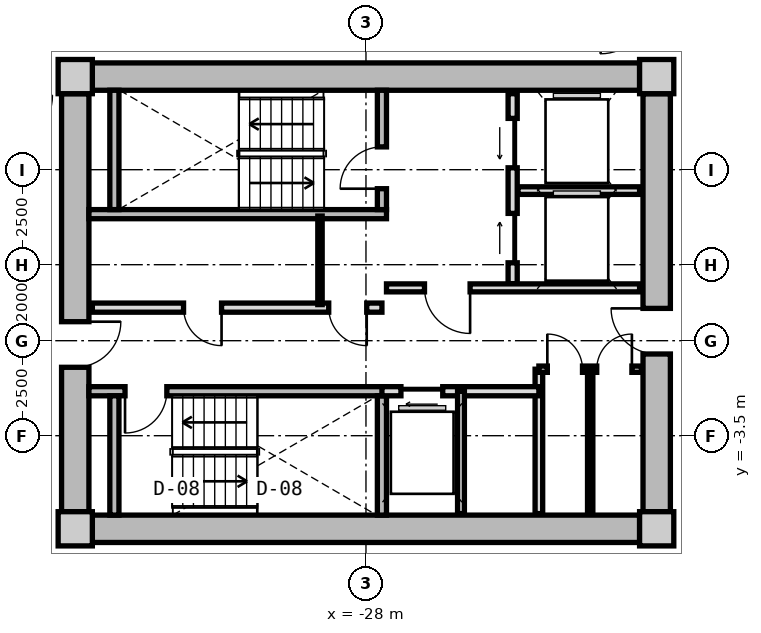
"""IFC4 building model, lengths in metres.
Left out: names, types, materials, properties, quantities, classifications, styles, units other than length and angle.
Written with IfcOpenShell. Run it as: python <this file> out.ifc"""

import sys

from ifc_helpers import new_model, si_unit, direction, frame, frame_2d, origin, origin_2d, place, context, subcontext, project, spatial, rectangle, extrude, source, transform, mapped, element, fill, save


model = new_model("IFC4")
c1 = context("Model", 3, precision=1e-05, world=origin(), true_north=direction((0.0, 1.0)))
c2 = subcontext(c1, "Body", "Model", "MODEL_VIEW")
j1 = project(units=[si_unit("LENGTHUNIT", "METRE"), si_unit("PLANEANGLEUNIT", "RADIAN")], contexts=[c1])
p1 = place(None, origin())
s1 = spatial("IfcSite", under=j1, at=p1, CompositionType="ELEMENT")
p2 = place(p1, origin())
s2 = spatial("IfcBuilding", under=s1, at=p2, CompositionType="ELEMENT")
p3 = place(p2, frame((0.0, 0.0, 123.7)))
s3 = spatial("IfcBuildingStorey", under=s2, at=p3, CompositionType="ELEMENT", Elevation=123.7)
m1 = source(origin(), c2, "Body", "SweptSolid", [
    extrude(rectangle(XDim=0.9, YDim=0.9, at=origin_2d()), origin(), (0.0, 0.0, 1.0), 3.05),
])
for number, where, z_axis, x_axis in (
    (1, (-35.65, -5.95, 0.0), (0.0, 0.0, 1.0), (1.0, 0.0, 0.0)),
    (2, (-20.35, -5.95, 0.0), (0.0, 0.0, 1.0), (1.0, 0.0, 0.0)),
    (3, (-20.35, 5.95, 0.0), (0.0, 0.0, 1.0), (1.0, 0.0, 0.0)),
    (4, (-35.65, 5.95, 0.0), (0.0, 0.0, 1.0), (1.0, 0.0, 0.0)),
):
    element("IfcColumn", number, at=place(p3, frame(where, z_axis=z_axis, x_axis=x_axis)), inside=s3, PredefinedType="COLUMN", context=c2, shape_type="MappedRepresentation", body=[
        mapped(m1, transform((0.0, 0.0, 0.0), x_axis=(1.0, 0.0, 0.0), y_axis=(0.0, 1.0, 0.0), z_axis=(0.0, 0.0, 1.0), scale=1.0)),
    ])
m2 = source(origin(), c2, "Body", "SweptSolid", [
    extrude(rectangle(XDim=14.4, YDim=0.72, at=frame_2d((7.2, 0.0))), origin(), (0.0, 0.0, 1.0), 2.79),
])
for number, where, z_axis, x_axis in (
    (5, (-35.2, 5.95, 0.0), (0.0, 0.0, 1.0), (1.0, 0.0, 0.0)),
    (6, (-20.8, -5.95, 0.0), (0.0, 0.0, 1.0), (-1.0, 0.0, 0.0)),
):
    element("IfcWall", number, at=place(p3, frame(where, z_axis=z_axis, x_axis=x_axis)), inside=s3, PredefinedType="SHEAR", context=c2, shape_type="MappedRepresentation", body=[
        mapped(m2, transform((0.0, 0.0, 0.0), x_axis=(1.0, 0.0, 0.0), y_axis=(0.0, 1.0, 0.0), z_axis=(0.0, 0.0, 1.0), scale=1.0)),
    ])
m3 = source(origin(), c2, "Body", "SweptSolid", [
    extrude(rectangle(XDim=11.0, YDim=0.72, at=frame_2d((5.5, 0.0))), origin(), (0.0, 0.0, 1.0), 2.79),
])
p4 = place(p3, frame((-35.65, -5.5, 0.0), z_axis=(0.0, 0.0, 1.0), x_axis=(0.0, 1.0, 0.0)))
e7 = element("IfcWall", 7, at=p4, inside=s3, PredefinedType="SHEAR", context=c2, shape_type="MappedRepresentation", body=[
    mapped(m3, transform((0.0, 0.0, 0.0), x_axis=(1.0, 0.0, 0.0), y_axis=(0.0, 1.0, 0.0), z_axis=(0.0, 0.0, 1.0), scale=1.0)),
])
p5 = place(p4, frame((3.8, 0.0, 0.0)))
e8 = element("IfcOpeningElement", 8, at=p5, cuts=e7, PredefinedType="OPENING", context=c2, shape_type="SweptSolid", body=[
    extrude(rectangle(XDim=1.2, YDim=2.15, at=frame_2d((0.6, 1.075))), frame((0.0, 0.37, 0.0), z_axis=(0.0, -1.0, 0.0), x_axis=(1.0, 0.0, 0.0)), (0.0, 0.0, 1.0), 0.74),
])
p6 = place(p3, frame((-20.35, 5.5, 0.0), z_axis=(0.0, 0.0, 1.0), x_axis=(0.0, -1.0, 0.0)))
e9 = element("IfcWall", 9, at=p6, inside=s3, PredefinedType="SHEAR", context=c2, shape_type="MappedRepresentation", body=[
    mapped(m3, transform((0.0, 0.0, 0.0), x_axis=(1.0, 0.0, 0.0), y_axis=(0.0, 1.0, 0.0), z_axis=(0.0, 0.0, 1.0), scale=1.0)),
])
p7 = place(p6, frame((5.65, 0.0, 0.0)))
e10 = element("IfcOpeningElement", 10, at=p7, cuts=e9, PredefinedType="OPENING", context=c2, shape_type="SweptSolid", body=[
    extrude(rectangle(XDim=1.2, YDim=2.15, at=frame_2d((0.6, 1.075))), frame((0.0, 0.37, 0.0), z_axis=(0.0, -1.0, 0.0), x_axis=(1.0, 0.0, 0.0)), (0.0, 0.0, 1.0), 0.74),
])
m4 = source(origin(), c2, "Body", "SweptSolid", [
    extrude(rectangle(XDim=7.83, YDim=0.24, at=frame_2d((3.915, 0.0))), origin(), (0.0, 0.0, 1.0), 2.79),
])
p8 = place(p3, frame((-35.29, 2.33, 0.0), z_axis=(0.0, 0.0, 1.0), x_axis=(1.0, 0.0, 0.0)))
e11 = element("IfcWall", 11, at=p8, inside=s3, PredefinedType="PARTITIONING", context=c2, shape_type="MappedRepresentation", body=[
    mapped(m4, transform((0.0, 0.0, 0.0), x_axis=(1.0, 0.0, 0.0), y_axis=(0.0, 1.0, 0.0), z_axis=(0.0, 0.0, 1.0), scale=1.0)),
])
m5 = source(origin(), c2, "Body", "SweptSolid", [
    extrude(rectangle(XDim=3.14, YDim=0.24, at=frame_2d((1.57, 0.0))), origin(), (0.0, 0.0, 1.0), 2.79),
])
p9 = place(p3, frame((-34.62, 2.45, 0.0), z_axis=(0.0, 0.0, 1.0), x_axis=(0.0, 1.0, 0.0)))
e12 = element("IfcWall", 12, at=p9, inside=s3, PredefinedType="PARTITIONING", context=c2, shape_type="MappedRepresentation", body=[
    mapped(m5, transform((0.0, 0.0, 0.0), x_axis=(1.0, 0.0, 0.0), y_axis=(0.0, 1.0, 0.0), z_axis=(0.0, 0.0, 1.0), scale=1.0)),
])
p10 = place(p3, frame((-27.58, 2.45, 0.0), z_axis=(0.0, 0.0, 1.0), x_axis=(0.0, 1.0, 0.0)))
e13 = element("IfcWall", 13, at=p10, inside=s3, PredefinedType="PARTITIONING", context=c2, shape_type="MappedRepresentation", body=[
    mapped(m5, transform((0.0, 0.0, 0.0), x_axis=(1.0, 0.0, 0.0), y_axis=(0.0, 1.0, 0.0), z_axis=(0.0, 0.0, 1.0), scale=1.0)),
])
p11 = place(p10, frame((0.55, 0.0, 0.0)))
e14 = element("IfcOpeningElement", 14, at=p11, cuts=e13, PredefinedType="OPENING", context=c2, shape_type="SweptSolid", body=[
    extrude(rectangle(XDim=1.1, YDim=2.15, at=frame_2d((0.55, 1.075))), frame((0.0, 0.13, 0.0), z_axis=(0.0, -1.0, 0.0), x_axis=(1.0, 0.0, 0.0)), (0.0, 0.0, 1.0), 0.26),
])
p12 = place(p3, frame((-35.29, -2.33, 0.0), z_axis=(0.0, 0.0, 1.0), x_axis=(1.0, 0.0, 0.0)))
e15 = element("IfcWall", 15, at=p12, inside=s3, PredefinedType="PARTITIONING", context=c2, shape_type="MappedRepresentation", body=[
    mapped(m4, transform((0.0, 0.0, 0.0), x_axis=(1.0, 0.0, 0.0), y_axis=(0.0, 1.0, 0.0), z_axis=(0.0, 0.0, 1.0), scale=1.0)),
])
p13 = place(p12, frame((0.95, 0.0, 0.0)))
e16 = element("IfcOpeningElement", 16, at=p13, cuts=e15, PredefinedType="OPENING", context=c2, shape_type="SweptSolid", body=[
    extrude(rectangle(XDim=1.1, YDim=2.15, at=frame_2d((0.55, 1.075))), frame((0.0, 0.13, 0.0), z_axis=(0.0, -1.0, 0.0), x_axis=(1.0, 0.0, 0.0)), (0.0, 0.0, 1.0), 0.26),
])
for number, where, z_axis, x_axis in (
    (17, (-34.62, -5.59, 0.0), (0.0, 0.0, 1.0), (0.0, 1.0, 0.0)),
    (18, (-27.58, -5.59, 0.0), (0.0, 0.0, 1.0), (0.0, 1.0, 0.0)),
):
    element("IfcWall", number, at=place(p3, frame(where, z_axis=z_axis, x_axis=x_axis)), inside=s3, PredefinedType="PARTITIONING", context=c2, shape_type="MappedRepresentation", body=[
        mapped(m5, transform((0.0, 0.0, 0.0), x_axis=(1.0, 0.0, 0.0), y_axis=(0.0, 1.0, 0.0), z_axis=(0.0, 0.0, 1.0), scale=1.0)),
    ])
m6 = source(origin(), c2, "Body", "SweptSolid", [
    extrude(rectangle(XDim=5.0, YDim=0.24, at=frame_2d((2.5, 0.0))), origin(), (0.0, 0.0, 1.0), 2.775),
])
p14 = place(p3, frame((-24.14, 0.5, 0.0), z_axis=(0.0, 0.0, 1.0), x_axis=(0.0, 1.0, 0.0)))
e19 = element("IfcWall", 19, at=p14, inside=s3, PredefinedType="PARTITIONING", context=c2, shape_type="MappedRepresentation", body=[
    mapped(m6, transform((0.0, 0.0, 0.0), x_axis=(1.0, 0.0, 0.0), y_axis=(0.0, 1.0, 0.0), z_axis=(0.0, 0.0, 1.0), scale=1.0)),
])
p15 = place(p14, frame((3.05, 0.0, 0.0)))
e20 = element("IfcOpeningElement", 20, at=p15, cuts=e19, PredefinedType="OPENING", context=c2, shape_type="SweptSolid", body=[
    extrude(rectangle(XDim=1.3, YDim=2.2, at=frame_2d((0.65, 1.1))), frame((0.0, 0.13, 0.0), z_axis=(0.0, -1.0, 0.0), x_axis=(1.0, 0.0, 0.0)), (0.0, 0.0, 1.0), 0.26),
])
p16 = place(p14, frame((0.55, 0.0, 0.0)))
e21 = element("IfcOpeningElement", 21, at=p16, cuts=e19, PredefinedType="OPENING", context=c2, shape_type="SweptSolid", body=[
    extrude(rectangle(XDim=1.3, YDim=2.2, at=frame_2d((0.65, 1.1))), frame((0.0, 0.13, 0.0), z_axis=(0.0, -1.0, 0.0), x_axis=(1.0, 0.0, 0.0)), (0.0, 0.0, 1.0), 0.26),
])
m7 = source(origin(), c2, "Body", "SweptSolid", [
    extrude(rectangle(XDim=3.2, YDim=0.2, at=frame_2d((1.6, 0.0))), origin(), (0.0, 0.0, 1.0), 2.775),
])
p17 = place(p3, frame((-24.0, 2.95, 0.0), z_axis=(0.0, 0.0, 1.0), x_axis=(1.0, 0.0, 0.0)))
e22 = element("IfcWall", 22, at=p17, inside=s3, PredefinedType="PARTITIONING", context=c2, shape_type="MappedRepresentation", body=[
    mapped(m7, transform((0.0, 0.0, 0.0), x_axis=(1.0, 0.0, 0.0), y_axis=(0.0, 1.0, 0.0), z_axis=(0.0, 0.0, 1.0), scale=1.0)),
])
m8 = source(origin(), c2, "Body", "SweptSolid", [
    extrude(rectangle(XDim=6.66, YDim=0.21, at=frame_2d((3.33, 0.0))), origin(), (0.0, 0.0, 1.0), 2.775),
])
p18 = place(p3, frame((-27.46, 0.39, 0.0), z_axis=(0.0, 0.0, 1.0), x_axis=(1.0, 0.0, 0.0)))
e23 = element("IfcWall", 23, at=p18, inside=s3, PredefinedType="PARTITIONING", context=c2, shape_type="MappedRepresentation", body=[
    mapped(m8, transform((0.0, 0.0, 0.0), x_axis=(1.0, 0.0, 0.0), y_axis=(0.0, 1.0, 0.0), z_axis=(0.0, 0.0, 1.0), scale=1.0)),
])
p19 = place(p18, frame((1.0, 0.0, 0.0)))
e24 = element("IfcOpeningElement", 24, at=p19, cuts=e23, PredefinedType="OPENING", context=c2, shape_type="SweptSolid", body=[
    extrude(rectangle(XDim=1.2, YDim=2.15, at=frame_2d((0.6, 1.075))), frame((0.0, 0.115, 0.0), z_axis=(0.0, -1.0, 0.0), x_axis=(1.0, 0.0, 0.0)), (0.0, 0.0, 1.0), 0.23),
])
m9 = source(origin(), c2, "Body", "SweptSolid", [
    extrude(rectangle(XDim=7.62, YDim=0.24, at=frame_2d((3.81, 0.0))), origin(), (0.0, 0.0, 1.0), 2.775),
])
p20 = place(p3, frame((-35.2, -0.13, 0.0), z_axis=(0.0, 0.0, 1.0), x_axis=(1.0, 0.0, 0.0)))
e25 = element("IfcWall", 25, at=p20, inside=s3, PredefinedType="PARTITIONING", context=c2, shape_type="MappedRepresentation", body=[
    mapped(m9, transform((0.0, 0.0, 0.0), x_axis=(1.0, 0.0, 0.0), y_axis=(0.0, 1.0, 0.0), z_axis=(0.0, 0.0, 1.0), scale=1.0)),
])
p21 = place(p20, frame((6.22, 0.0, 0.0)))
e26 = element("IfcOpeningElement", 26, at=p21, cuts=e25, PredefinedType="OPENING", context=c2, shape_type="SweptSolid", body=[
    extrude(rectangle(XDim=1.0, YDim=2.1, at=frame_2d((0.5, 1.05))), frame((0.0, 0.13, 0.0), z_axis=(0.0, -1.0, 0.0), x_axis=(1.0, 0.0, 0.0)), (0.0, 0.0, 1.0), 0.26),
])
p22 = place(p20, frame((2.4, 0.0, 0.0)))
e27 = element("IfcOpeningElement", 27, at=p22, cuts=e25, PredefinedType="OPENING", context=c2, shape_type="SweptSolid", body=[
    extrude(rectangle(XDim=1.0, YDim=2.1, at=frame_2d((0.5, 1.05))), frame((0.0, 0.13, 0.0), z_axis=(0.0, -1.0, 0.0), x_axis=(1.0, 0.0, 0.0)), (0.0, 0.0, 1.0), 0.26),
])
m10 = source(origin(), c2, "Body", "SweptSolid", [
    extrude(rectangle(XDim=2.33, YDim=0.115, at=frame_2d((1.165, 0.0))), origin(), (0.0, 0.0, 1.0), 2.775),
])
p23 = place(p3, frame((-29.21, -0.05, 0.0), z_axis=(0.0, 0.0, 1.0), x_axis=(0.0, 1.0, 0.0)))
e28 = element("IfcWall", 28, at=p23, inside=s3, PredefinedType="PARTITIONING", context=c2, shape_type="MappedRepresentation", body=[
    mapped(m10, transform((0.0, 0.0, 0.0), x_axis=(1.0, 0.0, 0.0), y_axis=(0.0, 1.0, 0.0), z_axis=(0.0, 0.0, 1.0), scale=1.0)),
])
m11 = source(origin(), c2, "Body", "SweptSolid", [
    extrude(rectangle(XDim=3.8, YDim=0.2, at=frame_2d((1.9, 0.0))), origin(), (0.0, 0.0, 1.0), 2.775),
])
p24 = place(p3, frame((-23.45, -5.55, 0.0), z_axis=(0.0, 0.0, 1.0), x_axis=(0.0, 1.0, 0.0)))
e29 = element("IfcWall", 29, at=p24, inside=s3, PredefinedType="PARTITIONING", context=c2, shape_type="MappedRepresentation", body=[
    mapped(m11, transform((0.0, 0.0, 0.0), x_axis=(1.0, 0.0, 0.0), y_axis=(0.0, 1.0, 0.0), z_axis=(0.0, 0.0, 1.0), scale=1.0)),
])
m12 = source(origin(), c2, "Body", "SweptSolid", [
    extrude(rectangle(XDim=4.13, YDim=0.24, at=frame_2d((2.065, 0.0))), origin(), (0.0, 0.0, 1.0), 2.775),
])
p25 = place(p3, frame((-27.58, -2.33, 0.0), z_axis=(0.0, 0.0, 1.0), x_axis=(1.0, 0.0, 0.0)))
e30 = element("IfcWall", 30, at=p25, inside=s3, PredefinedType="PARTITIONING", context=c2, shape_type="MappedRepresentation", body=[
    mapped(m12, transform((0.0, 0.0, 0.0), x_axis=(1.0, 0.0, 0.0), y_axis=(0.0, 1.0, 0.0), z_axis=(0.0, 0.0, 1.0), scale=1.0)),
])
p26 = place(p25, frame((0.5, 0.0, 0.0)))
e31 = element("IfcOpeningElement", 31, at=p26, cuts=e30, PredefinedType="OPENING", context=c2, shape_type="SweptSolid", body=[
    extrude(rectangle(XDim=1.1, YDim=2.2, at=frame_2d((0.55, 1.1))), frame((0.0, 0.13, 0.0), z_axis=(0.0, -1.0, 0.0), x_axis=(1.0, 0.0, 0.0)), (0.0, 0.0, 1.0), 0.26),
])
m13 = source(origin(), c2, "Body", "SweptSolid", [
    extrude(rectangle(XDim=3.22, YDim=0.18, at=frame_2d((1.61, 0.0))), origin(), (0.0, 0.0, 1.0), 2.775),
])
p27 = place(p3, frame((-25.5, -5.55, 0.0), z_axis=(0.0, 0.0, 1.0), x_axis=(0.0, 1.0, 0.0)))
e32 = element("IfcWall", 32, at=p27, inside=s3, PredefinedType="PARTITIONING", context=c2, shape_type="MappedRepresentation", body=[
    mapped(m13, transform((0.0, 0.0, 0.0), x_axis=(1.0, 0.0, 0.0), y_axis=(0.0, 1.0, 0.0), z_axis=(0.0, 0.0, 1.0), scale=1.0)),
])
m14 = source(origin(), c2, "Body", "SweptSolid", [
    extrude(rectangle(XDim=2.7, YDim=0.165, at=frame_2d((1.35, 0.0))), origin(), (0.0, 0.0, 1.0), 2.775),
])
p28 = place(p3, frame((-23.45, -1.75, 0.0), z_axis=(0.0, 0.0, 1.0), x_axis=(1.0, 0.0, 0.0)))
e33 = element("IfcWall", 33, at=p28, inside=s3, PredefinedType="PARTITIONING", context=c2, shape_type="MappedRepresentation", body=[
    mapped(m14, transform((0.0, 0.0, 0.0), x_axis=(1.0, 0.0, 0.0), y_axis=(0.0, 1.0, 0.0), z_axis=(0.0, 0.0, 1.0), scale=1.0)),
])
p29 = place(p28, frame((0.222, 0.0, 0.0)))
e34 = element("IfcOpeningElement", 34, at=p29, cuts=e33, PredefinedType="OPENING", context=c2, shape_type="SweptSolid", body=[
    extrude(rectangle(XDim=0.925, YDim=2.1, at=frame_2d((0.462, 1.05))), frame((0.0, 0.093, 0.0), z_axis=(0.0, -1.0, 0.0), x_axis=(1.0, 0.0, 0.0)), (0.0, 0.0, 1.0), 0.185),
])
p30 = place(p28, frame((1.522, 0.0, 0.0)))
e35 = element("IfcOpeningElement", 35, at=p30, cuts=e33, PredefinedType="OPENING", context=c2, shape_type="SweptSolid", body=[
    extrude(rectangle(XDim=0.925, YDim=2.1, at=frame_2d((0.462, 1.05))), frame((0.0, 0.093, 0.0), z_axis=(0.0, -1.0, 0.0), x_axis=(1.0, 0.0, 0.0)), (0.0, 0.0, 1.0), 0.185),
])
m15 = source(origin(), c2, "Body", "SweptSolid", [
    extrude(rectangle(XDim=3.8, YDim=0.14, at=frame_2d((1.9, 0.0))), origin(), (0.0, 0.0, 1.0), 2.775),
])
p31 = place(p3, frame((-22.1, -5.55, 0.0), z_axis=(0.0, 0.0, 1.0), x_axis=(0.0, 1.0, 0.0)))
e36 = element("IfcWall", 36, at=p31, inside=s3, PredefinedType="PARTITIONING", context=c2, shape_type="MappedRepresentation", body=[
    mapped(m15, transform((0.0, 0.0, 0.0), x_axis=(1.0, 0.0, 0.0), y_axis=(0.0, 1.0, 0.0), z_axis=(0.0, 0.0, 1.0), scale=1.0)),
])
m16 = source(origin(), c2, "Body", "SweptSolid", [
    extrude(rectangle(XDim=1.1, YDim=2.15, at=frame_2d((0.55, 1.075))), frame((0.0, 0.025, 0.0), z_axis=(0.0, -1.0, 0.0), x_axis=(1.0, 0.0, 0.0)), (0.0, 0.0, 1.0), 0.05),
])
p32 = place(p11, origin())
e37 = element("IfcDoor", 37, at=p32, inside=s3, OperationType="SINGLE_SWING_LEFT", PredefinedType="DOOR", context=c2, shape_type="MappedRepresentation", body=[
    mapped(m16, transform((0.0, 0.0, 0.0), x_axis=(1.0, 0.0, 0.0), y_axis=(0.0, 1.0, 0.0), z_axis=(0.0, 0.0, 1.0), scale=1.0)),
])
fill(e14, e37)
p33 = place(p13, frame((1.1, 0.0, 0.0), z_axis=(0.0, 0.0, 1.0), x_axis=(-1.0, 0.0, 0.0)))
e38 = element("IfcDoor", 38, at=p33, inside=s3, OperationType="SINGLE_SWING_RIGHT", PredefinedType="DOOR", context=c2, shape_type="MappedRepresentation", body=[
    mapped(m16, transform((0.0, 0.0, 0.0), x_axis=(1.0, 0.0, 0.0), y_axis=(0.0, 1.0, 0.0), z_axis=(0.0, 0.0, 1.0), scale=1.0)),
])
fill(e16, e38)
m17 = source(origin(), c2, "Body", "SweptSolid", [
    extrude(rectangle(XDim=1.3, YDim=2.2, at=frame_2d((0.65, 1.1))), frame((0.0, 0.025, 0.0), z_axis=(0.0, -1.0, 0.0), x_axis=(1.0, 0.0, 0.0)), (0.0, 0.0, 1.0), 0.05),
])
p34 = place(p15, origin())
e39 = element("IfcDoor", 39, at=p34, inside=s3, OperationType="SLIDING_TO_LEFT", PredefinedType="DOOR", context=c2, shape_type="MappedRepresentation", body=[
    mapped(m17, transform((0.0, 0.0, 0.0), x_axis=(1.0, 0.0, 0.0), y_axis=(0.0, 1.0, 0.0), z_axis=(0.0, 0.0, 1.0), scale=1.0)),
])
fill(e20, e39)
p35 = place(p16, origin())
e40 = element("IfcDoor", 40, at=p35, inside=s3, OperationType="SLIDING_TO_RIGHT", PredefinedType="DOOR", context=c2, shape_type="MappedRepresentation", body=[
    mapped(m17, transform((0.0, 0.0, 0.0), x_axis=(1.0, 0.0, 0.0), y_axis=(0.0, 1.0, 0.0), z_axis=(0.0, 0.0, 1.0), scale=1.0)),
])
fill(e21, e40)
m18 = source(origin(), c2, "Body", "SweptSolid", [
    extrude(rectangle(XDim=1.2, YDim=2.15, at=frame_2d((0.6, 1.075))), frame((0.0, 0.025, 0.0), z_axis=(0.0, -1.0, 0.0), x_axis=(1.0, 0.0, 0.0)), (0.0, 0.0, 1.0), 0.05),
])
p36 = place(p19, frame((1.2, 0.0, 0.0), z_axis=(0.0, 0.0, 1.0), x_axis=(-1.0, 0.0, 0.0)))
e41 = element("IfcDoor", 41, at=p36, inside=s3, OperationType="SINGLE_SWING_LEFT", PredefinedType="DOOR", context=c2, shape_type="MappedRepresentation", body=[
    mapped(m18, transform((0.0, 0.0, 0.0), x_axis=(1.0, 0.0, 0.0), y_axis=(0.0, 1.0, 0.0), z_axis=(0.0, 0.0, 1.0), scale=1.0)),
])
fill(e24, e41)
p37 = place(p5, frame((1.2, 0.0, 0.0), z_axis=(0.0, 0.0, 1.0), x_axis=(-1.0, 0.0, 0.0)))
e42 = element("IfcDoor", 42, at=p37, inside=s3, OperationType="SINGLE_SWING_LEFT", PredefinedType="DOOR", context=c2, shape_type="MappedRepresentation", body=[
    mapped(m18, transform((0.0, 0.0, 0.0), x_axis=(1.0, 0.0, 0.0), y_axis=(0.0, 1.0, 0.0), z_axis=(0.0, 0.0, 1.0), scale=1.0)),
])
fill(e8, e42)
p38 = place(p7, frame((1.2, 0.0, 0.0), z_axis=(0.0, 0.0, 1.0), x_axis=(-1.0, 0.0, 0.0)))
e43 = element("IfcDoor", 43, at=p38, inside=s3, OperationType="SINGLE_SWING_RIGHT", PredefinedType="DOOR", context=c2, shape_type="MappedRepresentation", body=[
    mapped(m18, transform((0.0, 0.0, 0.0), x_axis=(1.0, 0.0, 0.0), y_axis=(0.0, 1.0, 0.0), z_axis=(0.0, 0.0, 1.0), scale=1.0)),
])
fill(e10, e43)
m19 = source(origin(), c2, "Body", "SweptSolid", [
    extrude(rectangle(XDim=1.0, YDim=2.1, at=frame_2d((0.5, 1.05))), frame((0.0, 0.025, 0.0), z_axis=(0.0, -1.0, 0.0), x_axis=(1.0, 0.0, 0.0)), (0.0, 0.0, 1.0), 0.05),
])
p39 = place(p21, frame((1.0, 0.0, 0.0), z_axis=(0.0, 0.0, 1.0), x_axis=(-1.0, 0.0, 0.0)))
e44 = element("IfcDoor", 44, at=p39, inside=s3, OperationType="SINGLE_SWING_LEFT", PredefinedType="DOOR", context=c2, shape_type="MappedRepresentation", body=[
    mapped(m19, transform((0.0, 0.0, 0.0), x_axis=(1.0, 0.0, 0.0), y_axis=(0.0, 1.0, 0.0), z_axis=(0.0, 0.0, 1.0), scale=1.0)),
])
fill(e26, e44)
p40 = place(p22, frame((1.0, 0.0, 0.0), z_axis=(0.0, 0.0, 1.0), x_axis=(-1.0, 0.0, 0.0)))
e45 = element("IfcDoor", 45, at=p40, inside=s3, OperationType="SINGLE_SWING_LEFT", PredefinedType="DOOR", context=c2, shape_type="MappedRepresentation", body=[
    mapped(m19, transform((0.0, 0.0, 0.0), x_axis=(1.0, 0.0, 0.0), y_axis=(0.0, 1.0, 0.0), z_axis=(0.0, 0.0, 1.0), scale=1.0)),
])
fill(e27, e45)
m20 = source(origin(), c2, "Body", "SweptSolid", [
    extrude(rectangle(XDim=1.1, YDim=2.2, at=frame_2d((0.55, 1.1))), frame((0.0, 0.025, 0.0), z_axis=(0.0, -1.0, 0.0), x_axis=(1.0, 0.0, 0.0)), (0.0, 0.0, 1.0), 0.05),
])
p41 = place(p26, frame((1.1, 0.0, 0.0), z_axis=(0.0, 0.0, 1.0), x_axis=(-1.0, 0.0, 0.0)))
e46 = element("IfcDoor", 46, at=p41, inside=s3, OperationType="SLIDING_TO_LEFT", PredefinedType="DOOR", context=c2, shape_type="MappedRepresentation", body=[
    mapped(m20, transform((0.0, 0.0, 0.0), x_axis=(1.0, 0.0, 0.0), y_axis=(0.0, 1.0, 0.0), z_axis=(0.0, 0.0, 1.0), scale=1.0)),
])
fill(e31, e46)
m21 = source(origin(), c2, "Body", "SweptSolid", [
    extrude(rectangle(XDim=0.925, YDim=2.1, at=frame_2d((0.462, 1.05))), frame((0.0, 0.025, 0.0), z_axis=(0.0, -1.0, 0.0), x_axis=(1.0, 0.0, 0.0)), (0.0, 0.0, 1.0), 0.05),
])
p42 = place(p29, origin())
e47 = element("IfcDoor", 47, at=p42, inside=s3, OperationType="SINGLE_SWING_LEFT", PredefinedType="DOOR", context=c2, shape_type="MappedRepresentation", body=[
    mapped(m21, transform((0.0, 0.0, 0.0), x_axis=(1.0, 0.0, 0.0), y_axis=(0.0, 1.0, 0.0), z_axis=(0.0, 0.0, 1.0), scale=1.0)),
])
fill(e34, e47)
p43 = place(p30, origin())
e48 = element("IfcDoor", 48, at=p43, inside=s3, OperationType="SINGLE_SWING_RIGHT", PredefinedType="DOOR", context=c2, shape_type="MappedRepresentation", body=[
    mapped(m21, transform((0.0, 0.0, 0.0), x_axis=(1.0, 0.0, 0.0), y_axis=(0.0, 1.0, 0.0), z_axis=(0.0, 0.0, 1.0), scale=1.0)),
])
fill(e35, e48)
save(model, sys.argv[1])
